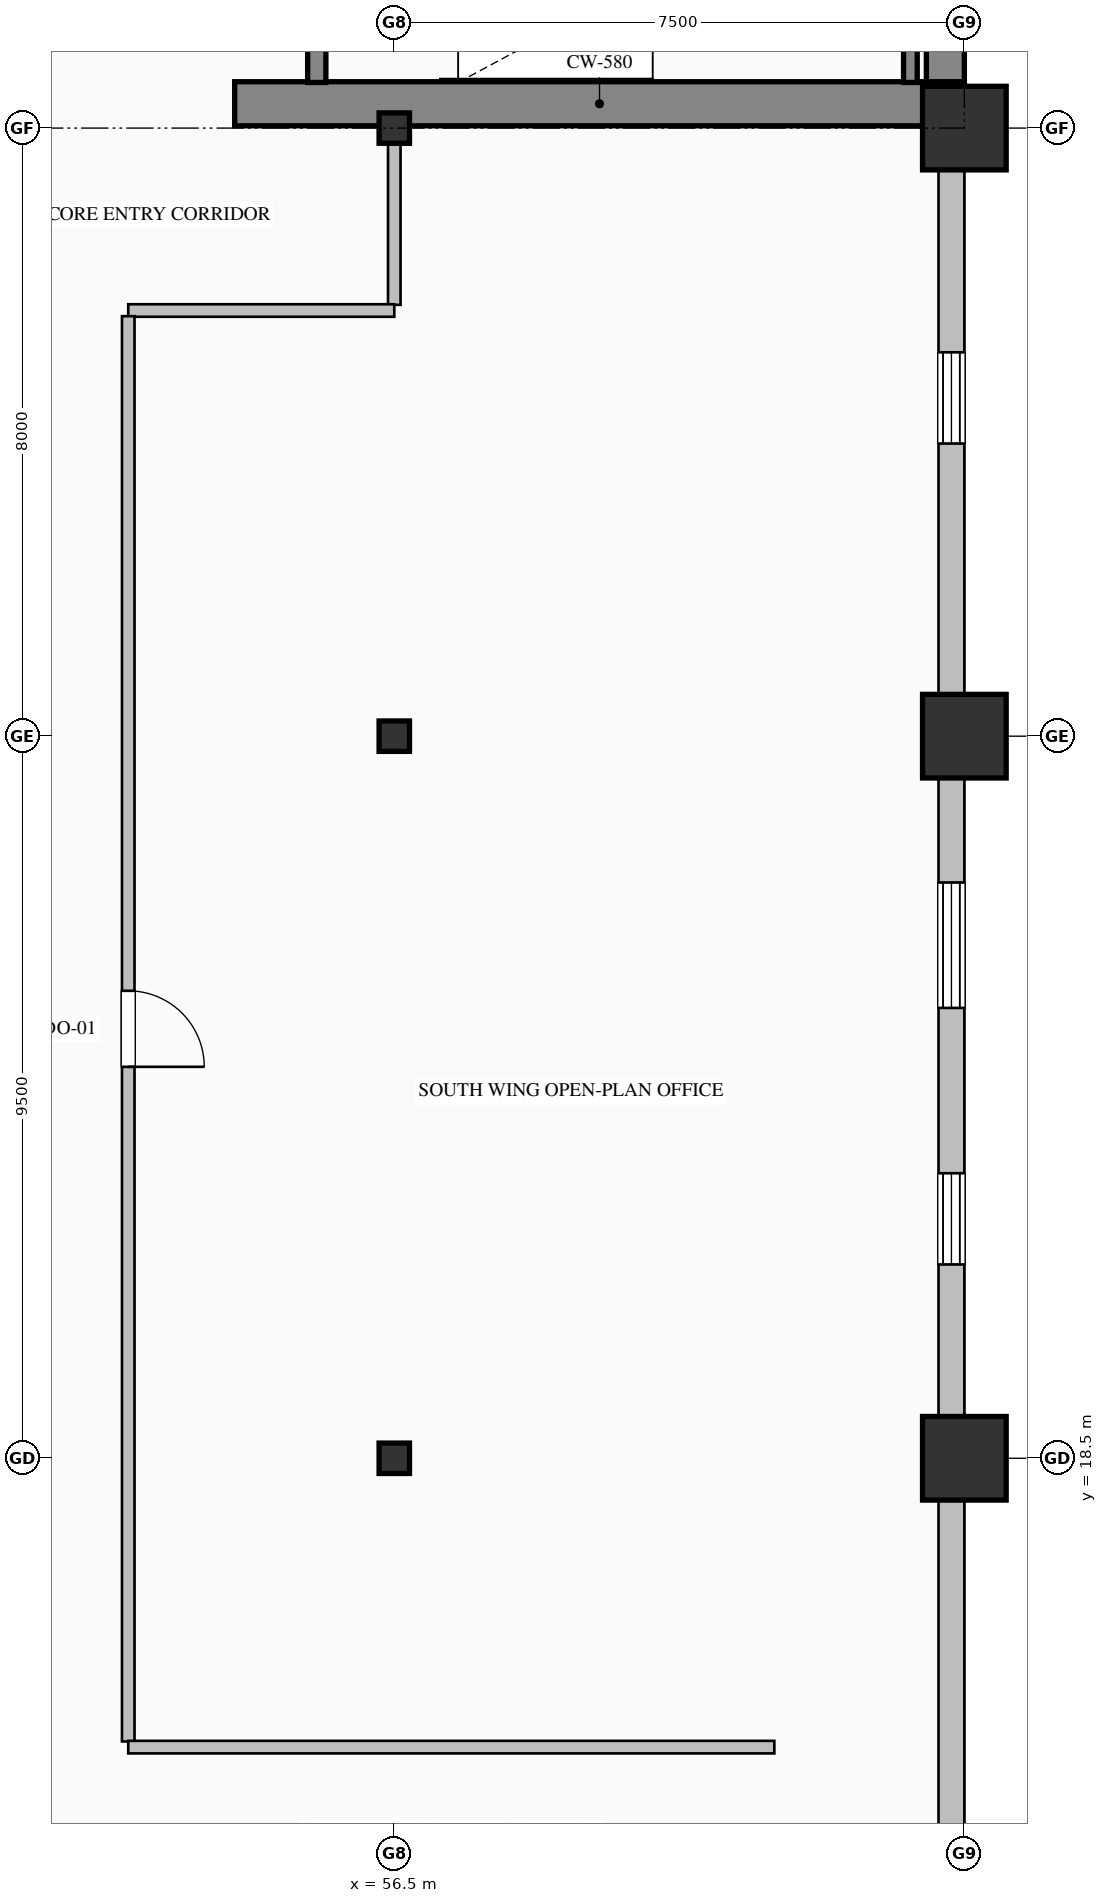
"""IFC4 building model, lengths in metres.
Left out: names, types, materials, properties, quantities, classifications, styles, units other than length and angle.
Written with IfcOpenShell. Run it as: python <this file> out.ifc"""

import sys

from ifc_helpers import new_model, si_unit, direction, frame, frame_2d, origin, origin_2d, place, context, subcontext, project, spatial, rectangle, hollow_rectangle, i_section, extrude, element, fill, save


model = new_model("IFC4")
c1 = context("Model", 3, precision=1e-05, world=origin(), true_north=direction((0.0, 1.0)))
c2 = subcontext(c1, "Body", "Model", "MODEL_VIEW")
j1 = project(units=[si_unit("LENGTHUNIT", "METRE"), si_unit("PLANEANGLEUNIT", "RADIAN")], contexts=[c1])
p1 = place(None, origin())
s1 = spatial("IfcSite", under=j1, at=p1, CompositionType="ELEMENT")
p2 = place(p1, origin())
s2 = spatial("IfcBuilding", under=s1, at=p2, CompositionType="ELEMENT")
p3 = place(p2, frame((0.0, 0.0, 135.0)))
s3 = spatial("IfcBuildingStorey", under=s2, at=p3, CompositionType="ELEMENT", Elevation=135.0)
p4 = place(p3, frame((63.75, 36.32, 0.0), z_axis=(0.0, 0.0, 1.0), x_axis=(0.0, 1.0, 0.0)))
e1 = element("IfcWall", 1, at=p4, inside=s3, PredefinedType="SHEAR", context=c2, shape_type="SweptSolid", body=[
    extrude(rectangle(XDim=15.18, YDim=0.5, at=frame_2d((7.59, 0.0))), origin(), (0.0, 0.0, 1.0), 3.765),
])
p5 = place(p3, frame((54.4, 36.32, 0.0), z_axis=(0.0, 0.0, 1.0), x_axis=(1.0, 0.0, 0.0)))
e2 = element("IfcWall", 2, at=p5, inside=s3, PredefinedType="SHEAR", context=c2, shape_type="SweptSolid", body=[
    extrude(rectangle(XDim=9.6, YDim=0.58, at=frame_2d((4.8, 0.0))), origin(), (0.0, 0.0, 1.0), 4.0),
])
for number, where, z_axis, x_axis in (
    (3, (56.5, 18.5, 0.0), (0.0, 0.0, 1.0), (1.0, 0.0, 0.0)),
    (4, (56.5, 28.0, 0.0), (0.0, 0.0, 1.0), (1.0, 0.0, 0.0)),
    (5, (56.5, 36.0, 0.0), (0.0, 0.0, 1.0), (1.0, 0.0, 0.0)),
):
    element("IfcColumn", number, at=place(p3, frame(where, z_axis=z_axis, x_axis=x_axis)), inside=s3, PredefinedType="COLUMN", context=c2, shape_type="SweptSolid", body=[
        extrude(i_section(OverallWidth=0.4, OverallDepth=0.4, WebThickness=0.013, FlangeThickness=0.021, FilletRadius=0.022, at=origin_2d()), origin(), (0.0, 0.0, 1.0), 4.0),
    ])
for number, where, z_axis, x_axis in (
    (6, (64.0, 18.5, 0.0), (0.0, 0.0, 1.0), (1.0, 0.0, 0.0)),
    (7, (64.0, 28.0, 0.0), (0.0, 0.0, 1.0), (1.0, 0.0, 0.0)),
    (8, (64.0, 36.0, 0.0), (0.0, 0.0, 1.0), (1.0, 0.0, 0.0)),
):
    element("IfcColumn", number, at=place(p3, frame(where, z_axis=z_axis, x_axis=x_axis)), inside=s3, PredefinedType="COLUMN", context=c2, shape_type="SweptSolid", body=[
        extrude(hollow_rectangle(XDim=1.1, YDim=1.1, WallThickness=0.04, at=origin_2d()), origin(), (0.0, 0.0, 1.0), 4.0),
    ])
p6 = place(p3, frame((63.83, 36.05, 0.0), z_axis=(0.0, 0.0, 1.0), x_axis=(0.0, -1.0, 0.0)))
e9 = element("IfcWall", 9, at=p6, inside=s3, PredefinedType="SOLIDWALL", context=c2, shape_type="SweptSolid", body=[
    extrude(rectangle(XDim=28.05, YDim=0.34, at=frame_2d((14.025, 0.0))), origin(), (0.0, 0.0, 1.0), 3.265),
])
p7 = place(p6, frame((3.0, 0.0, 0.7)))
e10 = element("IfcOpeningElement", 10, at=p7, cuts=e9, PredefinedType="OPENING", context=c2, shape_type="SweptSolid", body=[
    extrude(rectangle(XDim=1.2, YDim=1.85, at=frame_2d((0.6, 0.925))), frame((0.0, 0.18, 0.0), z_axis=(0.0, -1.0, 0.0), x_axis=(1.0, 0.0, 0.0)), (0.0, 0.0, 1.0), 0.36),
])
p8 = place(p6, frame((9.975, 0.0, 0.85)))
e11 = element("IfcOpeningElement", 11, at=p8, cuts=e9, PredefinedType="OPENING", context=c2, shape_type="SweptSolid", body=[
    extrude(rectangle(XDim=1.65, YDim=1.95, at=frame_2d((0.825, 0.975))), frame((0.0, 0.18, 0.0), z_axis=(0.0, -1.0, 0.0), x_axis=(1.0, 0.0, 0.0)), (0.0, 0.0, 1.0), 0.36),
])
p9 = place(p6, frame((13.8, 0.0, 0.7)))
e12 = element("IfcOpeningElement", 12, at=p9, cuts=e9, PredefinedType="OPENING", context=c2, shape_type="SweptSolid", body=[
    extrude(rectangle(XDim=1.2, YDim=1.85, at=frame_2d((0.6, 0.925))), frame((0.0, 0.18, 0.0), z_axis=(0.0, -1.0, 0.0), x_axis=(1.0, 0.0, 0.0)), (0.0, 0.0, 1.0), 0.36),
])
p10 = place(p6, frame((24.6, 0.0, 0.7)))
e13 = element("IfcOpeningElement", 13, at=p10, cuts=e9, PredefinedType="OPENING", context=c2, shape_type="SweptSolid", body=[
    extrude(rectangle(XDim=1.2, YDim=1.85, at=frame_2d((0.6, 0.925))), frame((0.0, 0.18, 0.0), z_axis=(0.0, -1.0, 0.0), x_axis=(1.0, 0.0, 0.0)), (0.0, 0.0, 1.0), 0.36),
])
p11 = place(p3, frame((55.48, 39.75, 0.0), z_axis=(0.0, 0.0, 1.0), x_axis=(0.0, -1.0, 0.0)))
e14 = element("IfcWall", 14, at=p11, inside=s3, PredefinedType="SOLIDWALL", context=c2, shape_type="SweptSolid", body=[
    extrude(rectangle(XDim=3.15, YDim=0.24, at=frame_2d((1.575, 0.0))), origin(), (0.0, 0.0, 1.0), 4.0),
])
p12 = place(p11, frame((1.0, 0.0, 0.0)))
e15 = element("IfcOpeningElement", 15, at=p12, cuts=e14, PredefinedType="OPENING", context=c2, shape_type="SweptSolid", body=[
    extrude(rectangle(XDim=1.15, YDim=2.2, at=frame_2d((0.575, 1.1))), frame((0.0, 0.13, 0.0), z_axis=(0.0, -1.0, 0.0), x_axis=(1.0, 0.0, 0.0)), (0.0, 0.0, 1.0), 0.26),
])
p13 = place(p3, frame((63.29, 36.6, 0.0), z_axis=(0.0, 0.0, 1.0), x_axis=(0.0, 1.0, 0.0)))
e16 = element("IfcWall", 16, at=p13, inside=s3, PredefinedType="SOLIDWALL", context=c2, shape_type="SweptSolid", body=[
    extrude(rectangle(XDim=3.15, YDim=0.18, at=frame_2d((1.575, 0.0))), origin(), (0.0, 0.0, 1.0), 4.0),
])
p14 = place(p3, frame((56.5, 36.0, 0.0), z_axis=(0.0, 0.0, 1.0), x_axis=(0.0, -1.0, 0.0)))
e17 = element("IfcWall", 17, at=p14, inside=s3, PredefinedType="PARTITIONING", context=c2, shape_type="SweptSolid", body=[
    extrude(rectangle(XDim=2.325, YDim=0.165, at=frame_2d((1.163, 0.0))), origin(), (0.0, 0.0, 1.0), 3.157),
])
p15 = place(p3, frame((56.5, 33.6, 0.0), z_axis=(0.0, 0.0, 1.0), x_axis=(-1.0, 0.0, 0.0)))
e18 = element("IfcWall", 18, at=p15, inside=s3, PredefinedType="PARTITIONING", context=c2, shape_type="SweptSolid", body=[
    extrude(rectangle(XDim=3.5, YDim=0.165, at=frame_2d((1.75, 0.0))), origin(), (0.0, 0.0, 1.0), 3.765),
])
p16 = place(p3, frame((53.0, 33.525, 0.0), z_axis=(0.0, 0.0, 1.0), x_axis=(0.0, -1.0, 0.0)))
e19 = element("IfcWall", 19, at=p16, inside=s3, PredefinedType="PARTITIONING", context=c2, shape_type="SweptSolid", body=[
    extrude(rectangle(XDim=18.751, YDim=0.165, at=frame_2d((9.375, 0.0))), origin(), (0.0, 0.0, 1.0), 3.765),
])
p17 = place(p16, frame((8.875, 0.0, 0.0)))
e20 = element("IfcOpeningElement", 20, at=p17, cuts=e19, PredefinedType="OPENING", context=c2, shape_type="SweptSolid", body=[
    extrude(rectangle(XDim=1.0, YDim=2.15, at=frame_2d((0.5, 1.075))), frame((0.0, 0.093, 0.0), z_axis=(0.0, -1.0, 0.0), x_axis=(1.0, 0.0, 0.0)), (0.0, 0.0, 1.0), 0.185),
])
p18 = place(p3, frame((53.0, 14.7, 0.0), z_axis=(0.0, 0.0, 1.0), x_axis=(1.0, 0.0, 0.0)))
e21 = element("IfcWall", 21, at=p18, inside=s3, PredefinedType="PARTITIONING", context=c2, shape_type="SweptSolid", body=[
    extrude(rectangle(XDim=8.5, YDim=0.165, at=frame_2d((4.25, 0.0))), origin(), (0.0, 0.0, 1.0), 3.765),
])
p19 = place(p7, origin())
e22 = element("IfcWindow", 22, at=p19, inside=s3, PartitioningType="DOUBLE_PANEL_VERTICAL", PredefinedType="WINDOW", context=c2, shape_type="SweptSolid", body=[
    extrude(rectangle(XDim=1.2, YDim=1.85, at=frame_2d((0.6, 0.925))), frame((0.0, 0.15, 0.0), z_axis=(0.0, -1.0, 0.0), x_axis=(1.0, 0.0, 0.0)), (0.0, 0.0, 1.0), 0.06),
])
fill(e10, e22)
p20 = place(p8, origin())
e23 = element("IfcWindow", 23, at=p20, inside=s3, PartitioningType="DOUBLE_PANEL_VERTICAL", PredefinedType="WINDOW", context=c2, shape_type="SweptSolid", body=[
    extrude(rectangle(XDim=1.65, YDim=1.95, at=frame_2d((0.825, 0.975))), frame((0.0, 0.15, 0.0), z_axis=(0.0, -1.0, 0.0), x_axis=(1.0, 0.0, 0.0)), (0.0, 0.0, 1.0), 0.06),
])
fill(e11, e23)
p21 = place(p9, origin())
e24 = element("IfcWindow", 24, at=p21, inside=s3, PartitioningType="DOUBLE_PANEL_VERTICAL", PredefinedType="WINDOW", context=c2, shape_type="SweptSolid", body=[
    extrude(rectangle(XDim=1.2, YDim=1.85, at=frame_2d((0.6, 0.925))), frame((0.0, 0.15, 0.0), z_axis=(0.0, -1.0, 0.0), x_axis=(1.0, 0.0, 0.0)), (0.0, 0.0, 1.0), 0.06),
])
fill(e12, e24)
p22 = place(p17, origin())
e25 = element("IfcDoor", 25, at=p22, inside=s3, OperationType="SINGLE_SWING_RIGHT", PredefinedType="DOOR", context=c2, shape_type="SweptSolid", body=[
    extrude(rectangle(XDim=1.0, YDim=2.15, at=frame_2d((0.5, 1.075))), frame((0.0, 0.025, 0.0), z_axis=(0.0, -1.0, 0.0), x_axis=(1.0, 0.0, 0.0)), (0.0, 0.0, 1.0), 0.05),
])
fill(e20, e25)
save(model, sys.argv[1])
